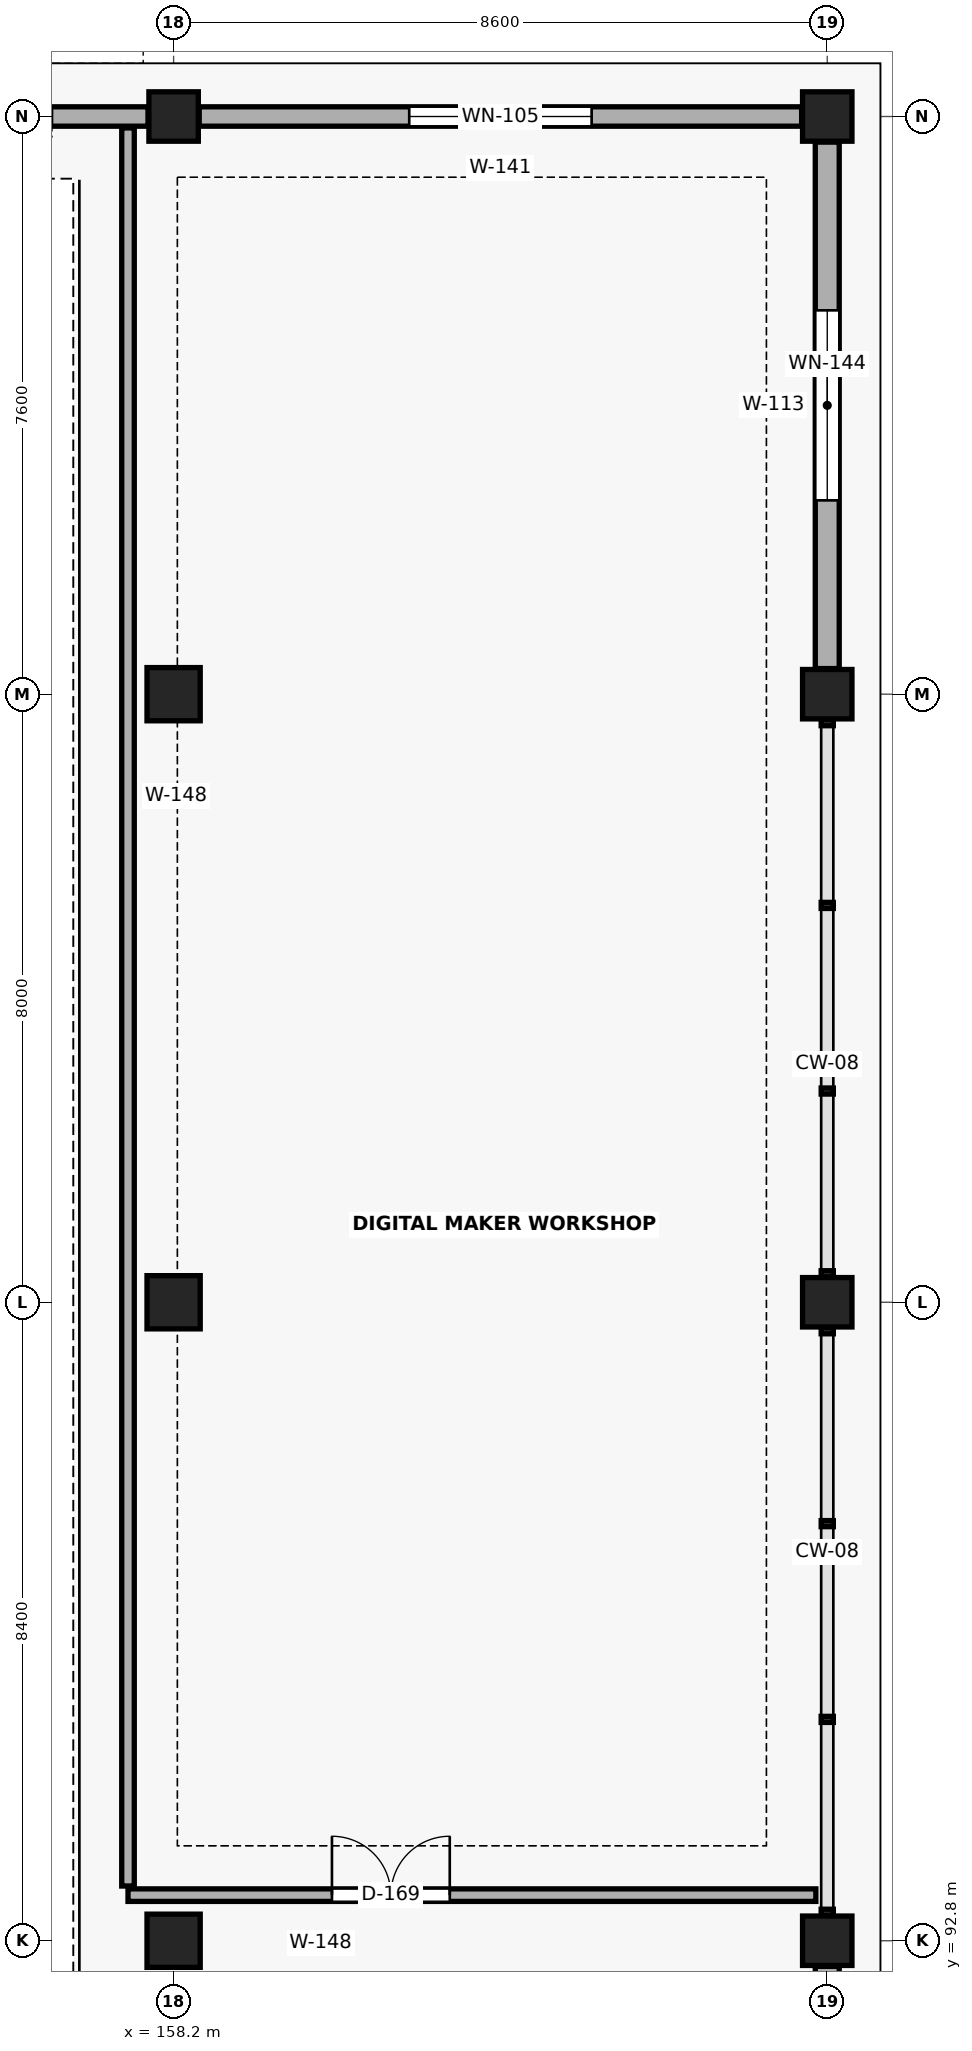
"""IFC4 building model, lengths in metres.
Left out: names, types, materials, properties, quantities, classifications, styles, units other than length and angle.
Written with IfcOpenShell. Run it as: python <this file> out.ifc"""

import sys

from ifc_helpers import new_model, si_unit, direction, frame, frame_2d, origin, origin_2d, place, context, subcontext, project, spatial, rectangle, extrude, element, fill, save


model = new_model("IFC4")
c1 = context("Model", 3, precision=1e-05, world=origin(), true_north=direction((0.0, 1.0)))
c2 = subcontext(c1, "Body", "Model", "MODEL_VIEW")
j1 = project(units=[si_unit("LENGTHUNIT", "METRE"), si_unit("PLANEANGLEUNIT", "RADIAN")], contexts=[c1])
p1 = place(None, origin())
s1 = spatial("IfcSite", under=j1, at=p1, CompositionType="ELEMENT")
p2 = place(p1, origin())
s2 = spatial("IfcBuilding", under=s1, at=p2, CompositionType="ELEMENT")
p3 = place(p2, origin())
s3 = spatial("IfcBuildingStorey", under=s2, at=p3, CompositionType="ELEMENT", Elevation=0.0)
for number, where, z_axis, x_axis in (
    (1, (158.2, 92.8, 0.0), (0.0, 0.0, 1.0), (1.0, 0.0, 0.0)),
    (2, (158.2, 101.2, 0.0), (0.0, 0.0, 1.0), (1.0, 0.0, 0.0)),
    (3, (158.2, 109.2, 0.0), (0.0, 0.0, 1.0), (1.0, 0.0, 0.0)),
):
    element("IfcColumn", number, at=place(p3, frame(where, z_axis=z_axis, x_axis=x_axis)), inside=s3, PredefinedType="COLUMN", context=c2, shape_type="SweptSolid", body=[
        extrude(rectangle(XDim=0.7, YDim=0.7, at=origin_2d()), origin(), (0.0, 0.0, 1.0), 5.1),
    ])
for number, where, z_axis, x_axis in (
    (4, (158.2, 116.8, 0.0), (0.0, 0.0, 1.0), (1.0, 0.0, 0.0)),
    (5, (166.8, 92.8, 0.0), (0.0, 0.0, 1.0), (1.0, 0.0, 0.0)),
    (6, (166.8, 101.2, 0.0), (0.0, 0.0, 1.0), (1.0, 0.0, 0.0)),
    (7, (166.8, 109.2, 0.0), (0.0, 0.0, 1.0), (1.0, 0.0, 0.0)),
    (8, (166.8, 116.8, 0.0), (0.0, 0.0, 1.0), (1.0, 0.0, 0.0)),
):
    element("IfcColumn", number, at=place(p3, frame(where, z_axis=z_axis, x_axis=x_axis)), inside=s3, PredefinedType="COLUMN", context=c2, shape_type="SweptSolid", body=[
        extrude(rectangle(XDim=0.65, YDim=0.65, at=origin_2d()), origin(), (0.0, 0.0, 1.0), 5.1),
    ])
p4 = place(p3, frame((149.737, 116.8, 0.0), z_axis=(0.0, 0.0, 1.0), x_axis=(1.0, 0.0, 0.0)))
e9 = element("IfcWall", 9, at=p4, inside=s3, PredefinedType="SOLIDWALL", context=c2, shape_type="SweptSolid", body=[
    extrude(rectangle(XDim=8.126, YDim=0.255, at=frame_2d((4.063, 0.0))), origin(), (0.0, 0.0, 1.0), 3.94),
])
p5 = place(p4, frame((1.263, 0.0, 0.0)))
e10 = element("IfcOpeningElement", 10, at=p5, cuts=e9, PredefinedType="OPENING", context=c2, shape_type="SweptSolid", body=[
    extrude(rectangle(XDim=5.6, YDim=3.3, at=frame_2d((2.8, 1.65))), frame((0.0, 0.139, 0.0), z_axis=(0.0, -1.0, 0.0), x_axis=(1.0, 0.0, 0.0)), (0.0, 0.0, 1.0), 0.279),
])
p6 = place(p3, frame((158.537, 116.8, 0.0), z_axis=(0.0, 0.0, 1.0), x_axis=(1.0, 0.0, 0.0)))
e11 = element("IfcWall", 11, at=p6, inside=s3, PredefinedType="SOLIDWALL", context=c2, shape_type="SweptSolid", body=[
    extrude(rectangle(XDim=7.926, YDim=0.255, at=frame_2d((3.963, 0.0))), origin(), (0.0, 0.0, 1.0), 3.94),
])
p7 = place(p6, frame((2.763, 0.0, 0.85)))
e12 = element("IfcOpeningElement", 12, at=p7, cuts=e11, PredefinedType="OPENING", context=c2, shape_type="SweptSolid", body=[
    extrude(rectangle(XDim=2.4, YDim=2.4, at=frame_2d((1.2, 1.2))), frame((0.0, 0.139, 0.0), z_axis=(0.0, -1.0, 0.0), x_axis=(1.0, 0.0, 0.0)), (0.0, 0.0, 1.0), 0.279),
])
p8 = place(p3, frame((166.8, 92.463, 0.0), z_axis=(0.0, 0.0, 1.0), x_axis=(0.0, -1.0, 0.0)))
e13 = element("IfcWall", 13, at=p8, inside=s3, PredefinedType="SOLIDWALL", context=c2, shape_type="SweptSolid", body=[
    extrude(rectangle(XDim=8.051, YDim=0.315, at=frame_2d((4.025, 0.0))), origin(), (0.0, 0.0, 1.0), 3.94),
])
p9 = place(p8, frame((2.775, 0.0, 0.85)))
e14 = element("IfcOpeningElement", 14, at=p9, cuts=e13, PredefinedType="OPENING", context=c2, shape_type="SweptSolid", body=[
    extrude(rectangle(XDim=2.5, YDim=2.4, at=frame_2d((1.25, 1.2))), frame((0.0, 0.169, 0.0), z_axis=(0.0, -1.0, 0.0), x_axis=(1.0, 0.0, 0.0)), (0.0, 0.0, 1.0), 0.339),
])
p10 = place(p3, frame((166.8, 116.463, 0.0), z_axis=(0.0, 0.0, 1.0), x_axis=(0.0, -1.0, 0.0)))
e15 = element("IfcWall", 15, at=p10, inside=s3, PredefinedType="SOLIDWALL", context=c2, shape_type="SweptSolid", body=[
    extrude(rectangle(XDim=6.926, YDim=0.315, at=frame_2d((3.463, 0.0))), origin(), (0.0, 0.0, 1.0), 3.94),
])
p11 = place(p10, frame((2.213, 0.0, 0.85)))
e16 = element("IfcOpeningElement", 16, at=p11, cuts=e15, PredefinedType="OPENING", context=c2, shape_type="SweptSolid", body=[
    extrude(rectangle(XDim=2.5, YDim=2.4, at=frame_2d((1.25, 1.2))), frame((0.0, 0.169, 0.0), z_axis=(0.0, -1.0, 0.0), x_axis=(1.0, 0.0, 0.0)), (0.0, 0.0, 1.0), 0.339),
])
p12 = place(p3, frame((157.6, 93.4, 0.0), z_axis=(0.0, 0.0, 1.0), x_axis=(1.0, 0.0, 0.0)))
e17 = element("IfcWall", 17, at=p12, inside=s3, PredefinedType="PARTITIONING", context=c2, shape_type="SweptSolid", body=[
    extrude(rectangle(XDim=9.05, YDim=0.165, at=frame_2d((4.525, 0.0))), origin(), (0.0, 0.0, 1.0), 4.8),
])
p13 = place(p12, frame((2.683, 0.0, 0.0)))
e18 = element("IfcOpeningElement", 18, at=p13, cuts=e17, PredefinedType="OPENING", context=c2, shape_type="SweptSolid", body=[
    extrude(rectangle(XDim=1.55, YDim=2.35, at=frame_2d((0.775, 1.175))), frame((0.0, 0.094, 0.0), z_axis=(0.0, -1.0, 0.0), x_axis=(1.0, 0.0, 0.0)), (0.0, 0.0, 1.0), 0.189),
])
p14 = place(p3, frame((157.6, 116.65, 0.0), z_axis=(0.0, 0.0, 1.0), x_axis=(0.0, -1.0, 0.0)))
e19 = element("IfcWall", 19, at=p14, inside=s3, PredefinedType="PARTITIONING", context=c2, shape_type="SweptSolid", body=[
    extrude(rectangle(XDim=23.13, YDim=0.165, at=frame_2d((11.565, 0.0))), origin(), (0.0, 0.0, 1.0), 4.8),
])
p15 = place(p7, origin())
e20 = element("IfcWindow", 20, at=p15, inside=s3, PartitioningType="SINGLE_PANEL", PredefinedType="WINDOW", context=c2, shape_type="SweptSolid", body=[
    extrude(rectangle(XDim=2.4, YDim=2.4, at=frame_2d((1.2, 1.2))), frame((0.0, 0.03, 0.0), z_axis=(0.0, -1.0, 0.0), x_axis=(1.0, 0.0, 0.0)), (0.0, 0.0, 1.0), 0.06),
])
fill(e12, e20)
p16 = place(p11, origin())
e21 = element("IfcWindow", 21, at=p16, inside=s3, PartitioningType="SINGLE_PANEL", PredefinedType="WINDOW", context=c2, shape_type="SweptSolid", body=[
    extrude(rectangle(XDim=2.5, YDim=2.4, at=frame_2d((1.25, 1.2))), frame((0.0, 0.03, 0.0), z_axis=(0.0, -1.0, 0.0), x_axis=(1.0, 0.0, 0.0)), (0.0, 0.0, 1.0), 0.06),
])
fill(e16, e21)
p17 = place(p13, origin())
e22 = element("IfcDoor", 22, at=p17, inside=s3, OperationType="DOUBLE_DOOR_SINGLE_SWING", PredefinedType="DOOR", context=c2, shape_type="SweptSolid", body=[
    extrude(rectangle(XDim=1.55, YDim=2.35, at=frame_2d((0.775, 1.175))), frame((0.0, 0.025, 0.0), z_axis=(0.0, -1.0, 0.0), x_axis=(1.0, 0.0, 0.0)), (0.0, 0.0, 1.0), 0.05),
])
fill(e18, e22)
save(model, sys.argv[1])
